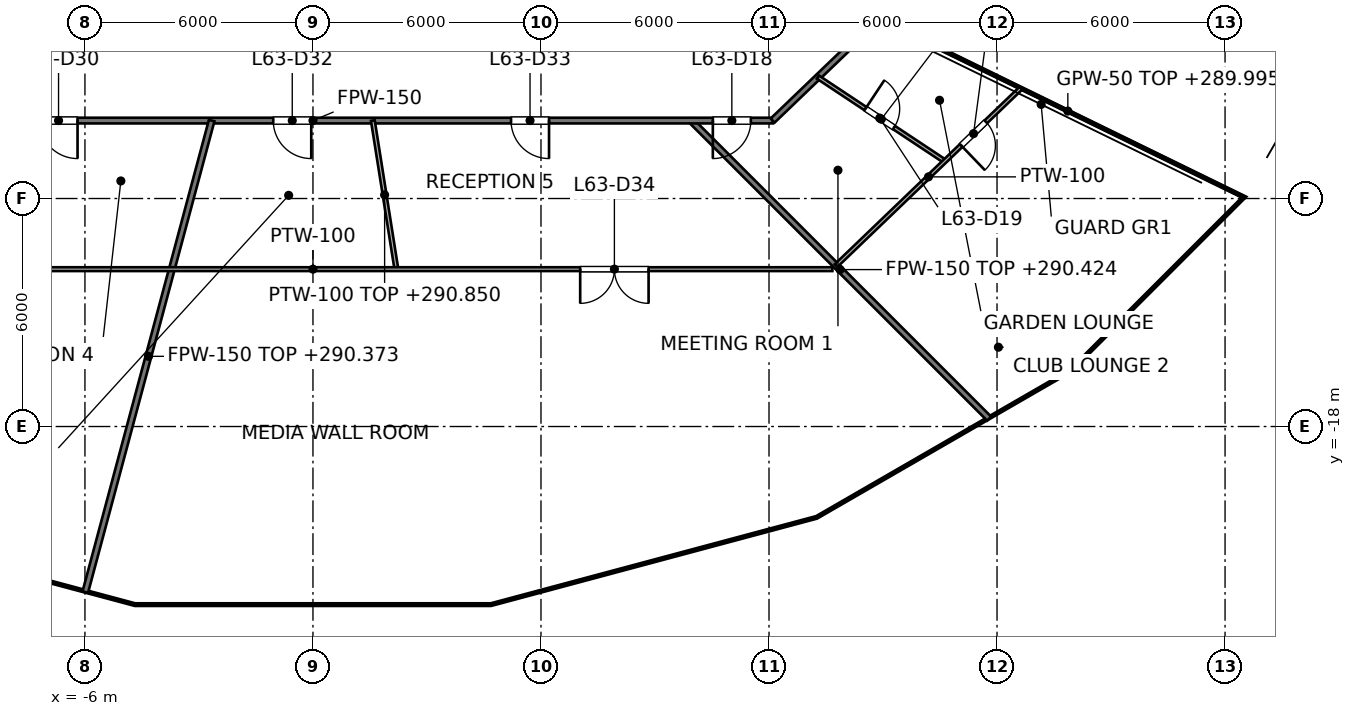
"""IFC4 building model, lengths in metres.
Left out: names, types, materials, properties, quantities, classifications, styles, units other than length and angle.
Written with IfcOpenShell. Run it as: python <this file> out.ifc"""

import sys

from ifc_helpers import new_model, si_unit, direction, frame, frame_2d, origin, place, context, subcontext, project, spatial, rectangle, extrude, element, fill, save


model = new_model("IFC4")
c1 = context("Model", 3, precision=1e-05, world=origin(), true_north=direction((0.0, 1.0)))
c2 = subcontext(c1, "Body", "Model", "MODEL_VIEW")
j1 = project(units=[si_unit("LENGTHUNIT", "METRE"), si_unit("PLANEANGLEUNIT", "RADIAN")], contexts=[c1])
p1 = place(None, origin())
s1 = spatial("IfcSite", under=j1, at=p1, CompositionType="ELEMENT")
p2 = place(p1, origin())
s2 = spatial("IfcBuilding", under=s1, at=p2, CompositionType="ELEMENT")
p3 = place(p2, frame((0.0, 0.0, 287.0)))
s3 = spatial("IfcBuildingStorey", under=s2, at=p3, CompositionType="ELEMENT", Elevation=287.0)
p4 = place(p3, frame((9.949, -9.949, 0.0), z_axis=(0.0, 0.0, 1.0), x_axis=(0.707106781187, -0.707106781187, 0.0)))
e1 = element("IfcWall", 1, at=p4, inside=s3, PredefinedType="PARTITIONING", context=c2, shape_type="SweptSolid", body=[
    extrude(rectangle(XDim=11.092, YDim=0.15, at=frame_2d((5.546, 0.0))), origin(), (0.0, 0.0, 1.0), 3.424),
])
p5 = place(p3, frame((-12.095, -9.949, 0.0), z_axis=(0.0, 0.0, 1.0), x_axis=(1.0, 0.0, 0.0)))
e2 = element("IfcWall", 2, at=p5, inside=s3, PredefinedType="PARTITIONING", context=c2, shape_type="SweptSolid", body=[
    extrude(rectangle(XDim=24.19, YDim=0.15, at=frame_2d((12.095, 0.0))), origin(), (0.0, 0.0, 1.0), 2.927),
])
p6 = place(p5, frame((22.617, 0.0, 0.0)))
e3 = element("IfcOpeningElement", 3, at=p6, cuts=e2, PredefinedType="OPENING", context=c2, shape_type="SweptSolid", body=[
    extrude(rectangle(XDim=1.0, YDim=2.1, at=frame_2d((0.5, 1.05))), frame((0.0, 0.075, 0.0), z_axis=(0.0, -1.0, 0.0), x_axis=(1.0, 0.0, 0.0)), (0.0, 0.0, 1.0), 0.15),
])
p7 = place(p5, frame((4.9, 0.0, 0.0)))
e4 = element("IfcOpeningElement", 4, at=p7, cuts=e2, PredefinedType="OPENING", context=c2, shape_type="SweptSolid", body=[
    extrude(rectangle(XDim=1.0, YDim=2.1, at=frame_2d((0.5, 1.05))), frame((0.0, 0.075, 0.0), z_axis=(0.0, -1.0, 0.0), x_axis=(1.0, 0.0, 0.0)), (0.0, 0.0, 1.0), 0.15),
])
p8 = place(p5, frame((11.05, 0.0, 0.0)))
e5 = element("IfcOpeningElement", 5, at=p8, cuts=e2, PredefinedType="OPENING", context=c2, shape_type="SweptSolid", body=[
    extrude(rectangle(XDim=1.0, YDim=2.1, at=frame_2d((0.5, 1.05))), frame((0.0, 0.075, 0.0), z_axis=(0.0, -1.0, 0.0), x_axis=(1.0, 0.0, 0.0)), (0.0, 0.0, 1.0), 0.15),
])
p9 = place(p5, frame((17.307, 0.0, 0.0)))
e6 = element("IfcOpeningElement", 6, at=p9, cuts=e2, PredefinedType="OPENING", context=c2, shape_type="SweptSolid", body=[
    extrude(rectangle(XDim=1.0, YDim=2.1, at=frame_2d((0.5, 1.05))), frame((0.0, 0.075, 0.0), z_axis=(0.0, -1.0, 0.0), x_axis=(1.0, 0.0, 0.0)), (0.0, 0.0, 1.0), 0.15),
])
p10 = place(p3, frame((12.095, -9.949, 0.0), z_axis=(0.0, 0.0, 1.0), x_axis=(0.721275760212, 0.692648018644, 0.0)))
e7 = element("IfcWall", 7, at=p10, inside=s3, PredefinedType="PARTITIONING", context=c2, shape_type="SweptSolid", body=[
    extrude(rectangle(XDim=6.473, YDim=0.15, at=frame_2d((3.236, 0.0))), origin(), (0.0, 0.0, 1.0), 2.995),
])
p11 = place(p3, frame((-5.991, -22.357, 0.0), z_axis=(0.0, 0.0, 1.0), x_axis=(0.258854832266, 0.965916236437, 0.0)))
e8 = element("IfcWall", 8, at=p11, inside=s3, PredefinedType="PARTITIONING", context=c2, shape_type="SweptSolid", body=[
    extrude(rectangle(XDim=12.846, YDim=0.15, at=frame_2d((6.423, 0.0))), origin(), (0.0, 0.0, 1.0), 3.373),
])
p12 = place(p3, frame((15.207, -7.426, 0.0), z_axis=(0.0, 0.0, 1.0), x_axis=(0.898599920473, -0.438768940247, 0.0)))
e9 = element("IfcWall", 9, at=p12, inside=s3, PredefinedType="PARTITIONING", context=c2, shape_type="SweptSolid", body=[
    extrude(rectangle(XDim=10.363, YDim=0.05, at=frame_2d((5.181, 0.0))), origin(), (0.0, 0.0, 1.0), 2.995),
])
p13 = place(p3, frame((1.576, -9.949, 0.0), z_axis=(0.0, 0.0, 1.0), x_axis=(0.156402769976, -0.987693360079, 0.0)))
e10 = element("IfcWall", 10, at=p13, inside=s3, PredefinedType="PARTITIONING", context=c2, shape_type="SweptSolid", body=[
    extrude(rectangle(XDim=3.959, YDim=0.1, at=frame_2d((1.979, 0.0))), origin(), (0.0, 0.0, 1.0), 3.85),
])
p14 = place(p3, frame((13.286, -8.805, 0.0), z_axis=(0.0, 0.0, 1.0), x_axis=(0.833425824466, -0.552631337434, 0.0)))
e11 = element("IfcWall", 11, at=p14, inside=s3, PredefinedType="PARTITIONING", context=c2, shape_type="SweptSolid", body=[
    extrude(rectangle(XDim=4.007, YDim=0.1, at=frame_2d((2.003, 0.0))), origin(), (0.0, 0.0, 1.0), 3.152),
])
p15 = place(p14, frame((1.503, 0.0, 0.0)))
e12 = element("IfcOpeningElement", 12, at=p15, cuts=e11, PredefinedType="OPENING", context=c2, shape_type="SweptSolid", body=[
    extrude(rectangle(XDim=0.9, YDim=2.1, at=frame_2d((0.45, 1.05))), frame((0.0, 0.05, 0.0), z_axis=(0.0, -1.0, 0.0), x_axis=(1.0, 0.0, 0.0)), (0.0, 0.0, 1.0), 0.1),
])
p16 = place(p3, frame((-13.668, -13.859, 0.0), z_axis=(0.0, 0.0, 1.0), x_axis=(1.0, 0.0, 0.0)))
e13 = element("IfcWall", 13, at=p16, inside=s3, PredefinedType="PARTITIONING", context=c2, shape_type="SweptSolid", body=[
    extrude(rectangle(XDim=27.336, YDim=0.1, at=frame_2d((13.668, 0.0))), origin(), (0.0, 0.0, 1.0), 2.927),
])
p17 = place(p16, frame((4.127, 0.0, 0.0)))
e14 = element("IfcOpeningElement", 14, at=p17, cuts=e13, PredefinedType="OPENING", context=c2, shape_type="SweptSolid", body=[
    extrude(rectangle(XDim=1.8, YDim=2.1, at=frame_2d((0.9, 1.05))), frame((0.0, 0.05, 0.0), z_axis=(0.0, -1.0, 0.0), x_axis=(1.0, 0.0, 0.0)), (0.0, 0.0, 1.0), 0.1),
])
p18 = place(p16, frame((20.699, 0.0, 0.0)))
e15 = element("IfcOpeningElement", 15, at=p18, cuts=e13, PredefinedType="OPENING", context=c2, shape_type="SweptSolid", body=[
    extrude(rectangle(XDim=1.8, YDim=2.1, at=frame_2d((0.9, 1.05))), frame((0.0, 0.05, 0.0), z_axis=(0.0, -1.0, 0.0), x_axis=(1.0, 0.0, 0.0)), (0.0, 0.0, 1.0), 0.1),
])
p19 = place(p3, frame((13.765, -13.765, 0.0), z_axis=(0.0, 0.0, 1.0), x_axis=(0.721426398833, 0.692491119847, 0.0)))
e16 = element("IfcWall", 16, at=p19, inside=s3, PredefinedType="PARTITIONING", context=c2, shape_type="SweptSolid", body=[
    extrude(rectangle(XDim=6.741, YDim=0.1, at=frame_2d((3.371, 0.0))), origin(), (0.0, 0.0, 1.0), 2.927),
])
p20 = place(p19, frame((4.563, 0.0, 0.0)))
e17 = element("IfcOpeningElement", 17, at=p20, cuts=e16, PredefinedType="OPENING", context=c2, shape_type="SweptSolid", body=[
    extrude(rectangle(XDim=0.9, YDim=2.1, at=frame_2d((0.45, 1.05))), frame((0.0, 0.05, 0.0), z_axis=(0.0, -1.0, 0.0), x_axis=(1.0, 0.0, 0.0)), (0.0, 0.0, 1.0), 0.1),
])
p21 = place(p6, origin())
e18 = element("IfcDoor", 18, at=p21, inside=s3, OperationType="SINGLE_SWING_LEFT", PredefinedType="DOOR", context=c2, shape_type="SweptSolid", body=[
    extrude(rectangle(XDim=1.0, YDim=2.1, at=frame_2d((0.5, 1.05))), frame((0.0, 0.025, 0.0), z_axis=(0.0, -1.0, 0.0), x_axis=(1.0, 0.0, 0.0)), (0.0, 0.0, 1.0), 0.05),
])
fill(e3, e18)
p22 = place(p15, origin())
e19 = element("IfcDoor", 19, at=p22, inside=s3, OperationType="SINGLE_SWING_LEFT", PredefinedType="DOOR", context=c2, shape_type="SweptSolid", body=[
    extrude(rectangle(XDim=0.9, YDim=2.1, at=frame_2d((0.45, 1.05))), frame((0.0, 0.025, 0.0), z_axis=(0.0, -1.0, 0.0), x_axis=(1.0, 0.0, 0.0)), (0.0, 0.0, 1.0), 0.05),
])
fill(e12, e19)
p23 = place(p20, origin())
e20 = element("IfcDoor", 20, at=p23, inside=s3, OperationType="SINGLE_SWING_LEFT", PredefinedType="DOOR", context=c2, shape_type="SweptSolid", body=[
    extrude(rectangle(XDim=0.9, YDim=2.1, at=frame_2d((0.45, 1.05))), frame((0.0, 0.025, 0.0), z_axis=(0.0, -1.0, 0.0), x_axis=(1.0, 0.0, 0.0)), (0.0, 0.0, 1.0), 0.05),
])
fill(e17, e20)
p24 = place(p7, origin())
e21 = element("IfcDoor", 21, at=p24, inside=s3, OperationType="SINGLE_SWING_RIGHT", PredefinedType="DOOR", context=c2, shape_type="SweptSolid", body=[
    extrude(rectangle(XDim=1.0, YDim=2.1, at=frame_2d((0.5, 1.05))), frame((0.0, 0.025, 0.0), z_axis=(0.0, -1.0, 0.0), x_axis=(1.0, 0.0, 0.0)), (0.0, 0.0, 1.0), 0.05),
])
fill(e4, e21)
p25 = place(p8, origin())
e22 = element("IfcDoor", 22, at=p25, inside=s3, OperationType="SINGLE_SWING_RIGHT", PredefinedType="DOOR", context=c2, shape_type="SweptSolid", body=[
    extrude(rectangle(XDim=1.0, YDim=2.1, at=frame_2d((0.5, 1.05))), frame((0.0, 0.025, 0.0), z_axis=(0.0, -1.0, 0.0), x_axis=(1.0, 0.0, 0.0)), (0.0, 0.0, 1.0), 0.05),
])
fill(e5, e22)
p26 = place(p9, origin())
e23 = element("IfcDoor", 23, at=p26, inside=s3, OperationType="SINGLE_SWING_RIGHT", PredefinedType="DOOR", context=c2, shape_type="SweptSolid", body=[
    extrude(rectangle(XDim=1.0, YDim=2.1, at=frame_2d((0.5, 1.05))), frame((0.0, 0.025, 0.0), z_axis=(0.0, -1.0, 0.0), x_axis=(1.0, 0.0, 0.0)), (0.0, 0.0, 1.0), 0.05),
])
fill(e6, e23)
p27 = place(p18, origin())
e24 = element("IfcDoor", 24, at=p27, inside=s3, OperationType="DOUBLE_DOOR_SINGLE_SWING", PredefinedType="DOOR", context=c2, shape_type="SweptSolid", body=[
    extrude(rectangle(XDim=1.8, YDim=2.1, at=frame_2d((0.9, 1.05))), frame((0.0, 0.025, 0.0), z_axis=(0.0, -1.0, 0.0), x_axis=(1.0, 0.0, 0.0)), (0.0, 0.0, 1.0), 0.05),
])
fill(e15, e24)
save(model, sys.argv[1])
